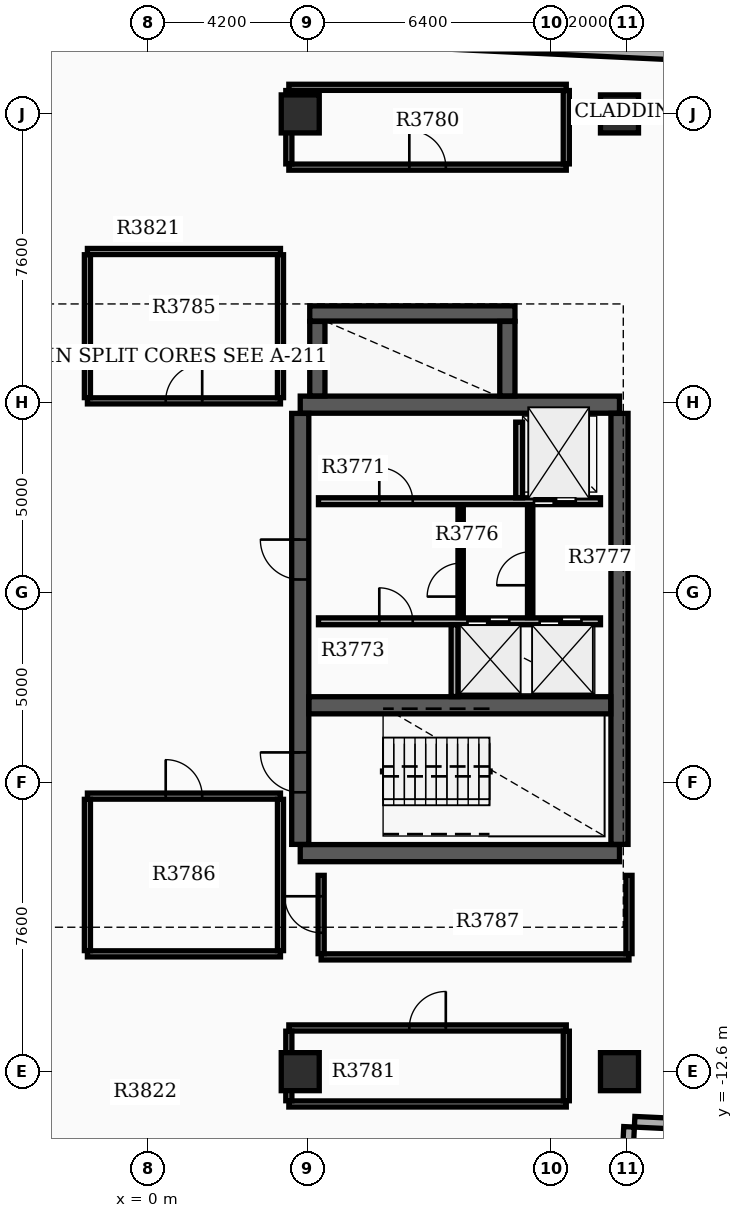
"""IFC4 building model, lengths in metres.
Left out: names, types, materials, properties, quantities, classifications, styles, units other than length and angle.
Written with IfcOpenShell. Run it as: python <this file> out.ifc"""

import sys

from ifc_helpers import new_model, si_unit, direction, frame, frame_2d, origin, origin_2d, place, context, subcontext, project, spatial, rectangle, extrude, element, fill, save


model = new_model("IFC4")
c1 = context("Model", 3, precision=1e-05, world=origin(), true_north=direction((0.0, 1.0)))
c2 = subcontext(c1, "Body", "Model", "MODEL_VIEW")
j1 = project(units=[si_unit("LENGTHUNIT", "METRE"), si_unit("PLANEANGLEUNIT", "RADIAN")], contexts=[c1])
p1 = place(None, origin())
s1 = spatial("IfcSite", under=j1, at=p1, CompositionType="ELEMENT")
p2 = place(p1, origin())
s2 = spatial("IfcBuilding", under=s1, at=p2, CompositionType="ELEMENT")
p3 = place(p2, frame((0.0, 0.0, 236.4)))
s3 = spatial("IfcBuildingStorey", under=s2, at=p3, CompositionType="ELEMENT", Elevation=236.4)
for number, where, z_axis, x_axis in (
    (1, (4.0, -6.85, 0.0), (0.0, 0.0, 1.0), (1.0, 0.0, 0.0)),
    (2, (4.0, 4.95, 0.0), (0.0, 0.0, 1.0), (1.0, 0.0, 0.0)),
):
    element("IfcWall", number, at=place(p3, frame(where, z_axis=z_axis, x_axis=x_axis)), inside=s3, PredefinedType="SHEAR", context=c2, shape_type="SweptSolid", body=[
        extrude(rectangle(XDim=8.4, YDim=0.45, at=frame_2d((4.2, 0.0))), origin(), (0.0, 0.0, 1.0), 3.65),
    ])
p4 = place(p3, frame((4.0, -6.62, 0.0), z_axis=(0.0, 0.0, 1.0), x_axis=(0.0, 1.0, 0.0)))
e3 = element("IfcWall", 3, at=p4, inside=s3, PredefinedType="SHEAR", context=c2, shape_type="SweptSolid", body=[
    extrude(rectangle(XDim=11.34, YDim=0.45, at=frame_2d((5.67, 0.0))), origin(), (0.0, 0.0, 1.0), 3.65),
])
p5 = place(p4, frame((1.37, 0.0, 0.0)))
e4 = element("IfcOpeningElement", 4, at=p5, cuts=e3, PredefinedType="OPENING", context=c2, shape_type="SweptSolid", body=[
    extrude(rectangle(XDim=1.05, YDim=2.15, at=frame_2d((0.525, 1.075))), frame((0.0, 0.235, 0.0), z_axis=(0.0, -1.0, 0.0), x_axis=(1.0, 0.0, 0.0)), (0.0, 0.0, 1.0), 0.47),
])
p6 = place(p4, frame((6.97, 0.0, 0.0)))
e5 = element("IfcOpeningElement", 5, at=p6, cuts=e3, PredefinedType="OPENING", context=c2, shape_type="SweptSolid", body=[
    extrude(rectangle(XDim=1.05, YDim=2.15, at=frame_2d((0.525, 1.075))), frame((0.0, 0.235, 0.0), z_axis=(0.0, -1.0, 0.0), x_axis=(1.0, 0.0, 0.0)), (0.0, 0.0, 1.0), 0.47),
])
p7 = place(p3, frame((12.4, -6.62, 0.0), z_axis=(0.0, 0.0, 1.0), x_axis=(0.0, 1.0, 0.0)))
e6 = element("IfcWall", 6, at=p7, inside=s3, PredefinedType="SHEAR", context=c2, shape_type="SweptSolid", body=[
    extrude(rectangle(XDim=11.34, YDim=0.45, at=frame_2d((5.67, 0.0))), origin(), (0.0, 0.0, 1.0), 3.65),
])
p8 = place(p3, frame((4.23, -2.96, 0.0), z_axis=(0.0, 0.0, 1.0), x_axis=(1.0, 0.0, 0.0)))
e7 = element("IfcWall", 7, at=p8, inside=s3, PredefinedType="SHEAR", context=c2, shape_type="SweptSolid", body=[
    extrude(rectangle(XDim=7.94, YDim=0.45, at=frame_2d((3.97, 0.0))), origin(), (0.0, 0.0, 1.0), 3.65),
])
p9 = place(p3, frame((4.45, 5.18, 0.0), z_axis=(0.0, 0.0, 1.0), x_axis=(0.0, 1.0, 0.0)))
e8 = element("IfcWall", 8, at=p9, inside=s3, PredefinedType="SHEAR", context=c2, shape_type="SweptSolid", body=[
    extrude(rectangle(XDim=1.96, YDim=0.4, at=frame_2d((0.98, 0.0))), origin(), (0.0, 0.0, 1.0), 3.65),
])
p10 = place(p3, frame((4.25, 7.35, 0.0), z_axis=(0.0, 0.0, 1.0), x_axis=(1.0, 0.0, 0.0)))
e9 = element("IfcWall", 9, at=p10, inside=s3, PredefinedType="SHEAR", context=c2, shape_type="SweptSolid", body=[
    extrude(rectangle(XDim=5.4, YDim=0.4, at=frame_2d((2.7, 0.0))), origin(), (0.0, 0.0, 1.0), 3.65),
])
p11 = place(p3, frame((9.45, 5.18, 0.0), z_axis=(0.0, 0.0, 1.0), x_axis=(0.0, 1.0, 0.0)))
e10 = element("IfcWall", 10, at=p11, inside=s3, PredefinedType="SHEAR", context=c2, shape_type="SweptSolid", body=[
    extrude(rectangle(XDim=1.96, YDim=0.4, at=frame_2d((0.98, 0.0))), origin(), (0.0, 0.0, 1.0), 3.65),
])
for number, where, z_axis, x_axis in (
    (11, (12.4, -12.6, 0.0), (0.0, 0.0, 1.0), (1.0, 0.0, 0.0)),
    (12, (12.4, 12.6, 0.0), (0.0, 0.0, 1.0), (1.0, 0.0, 0.0)),
    (13, (4.0, -12.6, 0.0), (0.0, 0.0, 1.0), (1.0, 0.0, 0.0)),
    (14, (4.0, 12.6, 0.0), (0.0, 0.0, 1.0), (1.0, 0.0, 0.0)),
):
    element("IfcColumn", number, at=place(p3, frame(where, z_axis=z_axis, x_axis=x_axis)), inside=s3, PredefinedType="COLUMN", context=c2, shape_type="SweptSolid", body=[
        extrude(rectangle(XDim=1.0, YDim=1.0, at=origin_2d()), origin(), (0.0, 0.0, 1.0), 3.9),
    ])
p12 = place(p3, frame((13.843, 14.164, 0.0), z_axis=(0.0, 0.0, 1.0), x_axis=(-0.998889082162, 0.047123258997, 0.0)))
e15 = element("IfcWall", 15, at=p12, inside=s3, PredefinedType="STANDARD", context=c2, shape_type="SweptSolid", body=[
    extrude(rectangle(XDim=6.3, YDim=0.28, at=frame_2d((3.15, 0.0))), origin(), (0.0, 0.0, 1.0), 3.13),
])
p13 = place(p3, frame((14.017, -13.976, 0.0), z_axis=(0.0, 0.0, 1.0), x_axis=(-0.998883930236, 0.047232339719, 0.0)))
e16 = element("IfcWall", 16, at=p13, inside=s3, PredefinedType="STANDARD", context=c2, shape_type="SweptSolid", body=[
    extrude(rectangle(XDim=1.22, YDim=0.28, at=frame_2d((0.61, 0.0))), origin(), (0.0, 0.0, 1.0), 3.13),
])
p14 = place(p3, frame((12.652, -14.052, 0.0), z_axis=(0.0, 0.0, 1.0), x_axis=(-0.047039284441, -0.99889304018, 0.0)))
e17 = element("IfcWall", 17, at=p14, inside=s3, PredefinedType="STANDARD", context=c2, shape_type="SweptSolid", body=[
    extrude(rectangle(XDim=1.5, YDim=0.28, at=frame_2d((0.75, 0.0))), origin(), (0.0, 0.0, 1.0), 3.13),
])
p15 = place(p3, frame((4.48, 2.41, 0.0), z_axis=(0.0, 0.0, 1.0), x_axis=(1.0, 0.0, 0.0)))
e18 = element("IfcWall", 18, at=p15, inside=s3, PredefinedType="SOLIDWALL", context=c2, shape_type="SweptSolid", body=[
    extrude(rectangle(XDim=7.42, YDim=0.18, at=frame_2d((3.71, 0.0))), origin(), (0.0, 0.0, 1.0), 3.12),
])
p16 = place(p15, frame((5.67, 0.0, 0.0)))
e19 = element("IfcOpeningElement", 19, at=p16, cuts=e18, PredefinedType="OPENING", context=c2, shape_type="SweptSolid", body=[
    extrude(rectangle(XDim=1.1, YDim=2.15, at=frame_2d((0.55, 1.075))), frame((0.0, 0.1, 0.0), z_axis=(0.0, -1.0, 0.0), x_axis=(1.0, 0.0, 0.0)), (0.0, 0.0, 1.0), 0.2),
])
p17 = place(p15, frame((1.6, 0.0, 0.0)))
e20 = element("IfcOpeningElement", 20, at=p17, cuts=e18, PredefinedType="OPENING", context=c2, shape_type="SweptSolid", body=[
    extrude(rectangle(XDim=0.88, YDim=2.1, at=frame_2d((0.44, 1.05))), frame((0.0, 0.1, 0.0), z_axis=(0.0, -1.0, 0.0), x_axis=(1.0, 0.0, 0.0)), (0.0, 0.0, 1.0), 0.2),
])
p18 = place(p3, frame((4.48, -0.75, 0.0), z_axis=(0.0, 0.0, 1.0), x_axis=(1.0, 0.0, 0.0)))
e21 = element("IfcWall", 21, at=p18, inside=s3, PredefinedType="SOLIDWALL", context=c2, shape_type="SweptSolid", body=[
    extrude(rectangle(XDim=7.42, YDim=0.18, at=frame_2d((3.71, 0.0))), origin(), (0.0, 0.0, 1.0), 3.12),
])
p19 = place(p18, frame((3.92, 0.0, 0.0)))
e22 = element("IfcOpeningElement", 22, at=p19, cuts=e21, PredefinedType="OPENING", context=c2, shape_type="SweptSolid", body=[
    extrude(rectangle(XDim=1.1, YDim=2.15, at=frame_2d((0.55, 1.075))), frame((0.0, 0.1, 0.0), z_axis=(0.0, -1.0, 0.0), x_axis=(1.0, 0.0, 0.0)), (0.0, 0.0, 1.0), 0.2),
])
p20 = place(p18, frame((5.82, 0.0, 0.0)))
e23 = element("IfcOpeningElement", 23, at=p20, cuts=e21, PredefinedType="OPENING", context=c2, shape_type="SweptSolid", body=[
    extrude(rectangle(XDim=1.1, YDim=2.15, at=frame_2d((0.55, 1.075))), frame((0.0, 0.1, 0.0), z_axis=(0.0, -1.0, 0.0), x_axis=(1.0, 0.0, 0.0)), (0.0, 0.0, 1.0), 0.2),
])
p21 = place(p18, frame((1.6, 0.0, 0.0)))
e24 = element("IfcOpeningElement", 24, at=p21, cuts=e21, PredefinedType="OPENING", context=c2, shape_type="SweptSolid", body=[
    extrude(rectangle(XDim=0.88, YDim=2.1, at=frame_2d((0.44, 1.05))), frame((0.0, 0.1, 0.0), z_axis=(0.0, -1.0, 0.0), x_axis=(1.0, 0.0, 0.0)), (0.0, 0.0, 1.0), 0.2),
])
p22 = place(p3, frame((9.76, 2.5, 0.0), z_axis=(0.0, 0.0, 1.0), x_axis=(0.0, 1.0, 0.0)))
e25 = element("IfcWall", 25, at=p22, inside=s3, PredefinedType="SOLIDWALL", context=c2, shape_type="SweptSolid", body=[
    extrude(rectangle(XDim=1.99, YDim=0.18, at=frame_2d((0.995, 0.0))), origin(), (0.0, 0.0, 1.0), 3.12),
])
p23 = place(p3, frame((8.06, -2.73, 0.0), z_axis=(0.0, 0.0, 1.0), x_axis=(0.0, 1.0, 0.0)))
e26 = element("IfcWall", 26, at=p23, inside=s3, PredefinedType="SOLIDWALL", context=c2, shape_type="SweptSolid", body=[
    extrude(rectangle(XDim=1.89, YDim=0.18, at=frame_2d((0.945, 0.0))), origin(), (0.0, 0.0, 1.0), 3.12),
])
p24 = place(p3, frame((8.22, -0.65, 0.0), z_axis=(0.0, 0.0, 1.0), x_axis=(0.0, 1.0, 0.0)))
e27 = element("IfcWall", 27, at=p24, inside=s3, PredefinedType="SOLIDWALL", context=c2, shape_type="SweptSolid", body=[
    extrude(rectangle(XDim=2.96, YDim=0.14, at=frame_2d((1.48, 0.0))), origin(), (0.0, 0.0, 1.0), 3.12),
])
p25 = place(p24, frame((0.55, 0.0, 0.0)))
e28 = element("IfcOpeningElement", 28, at=p25, cuts=e27, PredefinedType="OPENING", context=c2, shape_type="SweptSolid", body=[
    extrude(rectangle(XDim=0.88, YDim=2.1, at=frame_2d((0.44, 1.05))), frame((0.0, 0.08, 0.0), z_axis=(0.0, -1.0, 0.0), x_axis=(1.0, 0.0, 0.0)), (0.0, 0.0, 1.0), 0.16),
])
p26 = place(p3, frame((10.05, -0.652, 0.0), z_axis=(0.0, 0.0, 1.0), x_axis=(0.0, 1.0, 0.0)))
e29 = element("IfcWall", 29, at=p26, inside=s3, PredefinedType="PARTITIONING", context=c2, shape_type="SweptSolid", body=[
    extrude(rectangle(XDim=2.962, YDim=0.14, at=frame_2d((1.481, 0.0))), origin(), (0.0, 0.0, 1.0), 3.12),
])
p27 = place(p26, frame((0.85, 0.0, 0.0)))
e30 = element("IfcOpeningElement", 30, at=p27, cuts=e29, PredefinedType="OPENING", context=c2, shape_type="SweptSolid", body=[
    extrude(rectangle(XDim=0.88, YDim=2.1, at=frame_2d((0.44, 1.05))), frame((0.0, 0.08, 0.0), z_axis=(0.0, -1.0, 0.0), x_axis=(1.0, 0.0, 0.0)), (0.0, 0.0, 1.0), 0.16),
])
p28 = place(p3, frame((3.7, 11.2, 0.0), z_axis=(0.0, 0.0, 1.0), x_axis=(1.0, 0.0, 0.0)))
e31 = element("IfcWall", 31, at=p28, inside=s3, PredefinedType="PARTITIONING", context=c2, shape_type="SweptSolid", body=[
    extrude(rectangle(XDim=7.3, YDim=0.16, at=frame_2d((3.65, 0.0))), origin(), (0.0, 0.0, 1.0), 3.12),
])
p29 = place(p28, frame((3.17, 0.0, 0.0)))
e32 = element("IfcOpeningElement", 32, at=p29, cuts=e31, PredefinedType="OPENING", context=c2, shape_type="SweptSolid", body=[
    extrude(rectangle(XDim=0.96, YDim=2.15, at=frame_2d((0.48, 1.075))), frame((0.0, 0.09, 0.0), z_axis=(0.0, -1.0, 0.0), x_axis=(1.0, 0.0, 0.0)), (0.0, 0.0, 1.0), 0.18),
])
p30 = place(p3, frame((3.7, 13.3, 0.0), z_axis=(0.0, 0.0, 1.0), x_axis=(1.0, 0.0, 0.0)))
e33 = element("IfcWall", 33, at=p30, inside=s3, PredefinedType="PARTITIONING", context=c2, shape_type="SweptSolid", body=[
    extrude(rectangle(XDim=7.3, YDim=0.16, at=frame_2d((3.65, 0.0))), origin(), (0.0, 0.0, 1.0), 3.12),
])
for number, where, z_axis, x_axis in (
    (34, (3.7, 11.285, 0.0), (0.0, 0.0, 1.0), (0.0, 1.0, 0.0)),
    (35, (11.0, 11.285, 0.0), (0.0, 0.0, 1.0), (0.0, 1.0, 0.0)),
):
    element("IfcWall", number, at=place(p3, frame(where, z_axis=z_axis, x_axis=x_axis)), inside=s3, PredefinedType="PARTITIONING", context=c2, shape_type="SweptSolid", body=[
        extrude(rectangle(XDim=1.93, YDim=0.16, at=frame_2d((0.965, 0.0))), origin(), (0.0, 0.0, 1.0), 3.12),
    ])
p31 = place(p3, frame((3.7, -13.45, 0.0), z_axis=(0.0, 0.0, 1.0), x_axis=(1.0, 0.0, 0.0)))
e36 = element("IfcWall", 36, at=p31, inside=s3, PredefinedType="PARTITIONING", context=c2, shape_type="SweptSolid", body=[
    extrude(rectangle(XDim=7.3, YDim=0.16, at=frame_2d((3.65, 0.0))), origin(), (0.0, 0.0, 1.0), 3.12),
])
p32 = place(p3, frame((3.7, -11.45, 0.0), z_axis=(0.0, 0.0, 1.0), x_axis=(1.0, 0.0, 0.0)))
e37 = element("IfcWall", 37, at=p32, inside=s3, PredefinedType="PARTITIONING", context=c2, shape_type="SweptSolid", body=[
    extrude(rectangle(XDim=7.3, YDim=0.16, at=frame_2d((3.65, 0.0))), origin(), (0.0, 0.0, 1.0), 3.12),
])
p33 = place(p32, frame((3.17, 0.0, 0.0)))
e38 = element("IfcOpeningElement", 38, at=p33, cuts=e37, PredefinedType="OPENING", context=c2, shape_type="SweptSolid", body=[
    extrude(rectangle(XDim=0.96, YDim=2.15, at=frame_2d((0.48, 1.075))), frame((0.0, 0.09, 0.0), z_axis=(0.0, -1.0, 0.0), x_axis=(1.0, 0.0, 0.0)), (0.0, 0.0, 1.0), 0.18),
])
for number, where, z_axis, x_axis in (
    (39, (3.7, -13.365, 0.0), (0.0, 0.0, 1.0), (0.0, 1.0, 0.0)),
    (40, (11.0, -13.365, 0.0), (0.0, 0.0, 1.0), (0.0, 1.0, 0.0)),
):
    element("IfcWall", number, at=place(p3, frame(where, z_axis=z_axis, x_axis=x_axis)), inside=s3, PredefinedType="PARTITIONING", context=c2, shape_type="SweptSolid", body=[
        extrude(rectangle(XDim=1.83, YDim=0.16, at=frame_2d((0.915, 0.0))), origin(), (0.0, 0.0, 1.0), 3.12),
    ])
p34 = place(p3, frame((-1.6, 5.05, 0.0), z_axis=(0.0, 0.0, 1.0), x_axis=(1.0, 0.0, 0.0)))
e41 = element("IfcWall", 41, at=p34, inside=s3, PredefinedType="PARTITIONING", context=c2, shape_type="SweptSolid", body=[
    extrude(rectangle(XDim=5.08, YDim=0.16, at=frame_2d((2.54, 0.0))), origin(), (0.0, 0.0, 1.0), 3.12),
])
p35 = place(p34, frame((2.06, 0.0, 0.0)))
e42 = element("IfcOpeningElement", 42, at=p35, cuts=e41, PredefinedType="OPENING", context=c2, shape_type="SweptSolid", body=[
    extrude(rectangle(XDim=0.96, YDim=2.15, at=frame_2d((0.48, 1.075))), frame((0.0, 0.09, 0.0), z_axis=(0.0, -1.0, 0.0), x_axis=(1.0, 0.0, 0.0)), (0.0, 0.0, 1.0), 0.18),
])
p36 = place(p3, frame((-1.6, 8.98, 0.0), z_axis=(0.0, 0.0, 1.0), x_axis=(1.0, 0.0, 0.0)))
e43 = element("IfcWall", 43, at=p36, inside=s3, PredefinedType="PARTITIONING", context=c2, shape_type="SweptSolid", body=[
    extrude(rectangle(XDim=5.08, YDim=0.16, at=frame_2d((2.54, 0.0))), origin(), (0.0, 0.0, 1.0), 3.12),
])
for number, where, z_axis, x_axis in (
    (44, (-1.6, 5.135, 0.0), (0.0, 0.0, 1.0), (0.0, 1.0, 0.0)),
    (45, (3.48, 5.135, 0.0), (0.0, 0.0, 1.0), (0.0, 1.0, 0.0)),
):
    element("IfcWall", number, at=place(p3, frame(where, z_axis=z_axis, x_axis=x_axis)), inside=s3, PredefinedType="PARTITIONING", context=c2, shape_type="SweptSolid", body=[
        extrude(rectangle(XDim=3.76, YDim=0.16, at=frame_2d((1.88, 0.0))), origin(), (0.0, 0.0, 1.0), 3.12),
    ])
p37 = place(p3, frame((-1.6, -9.5, 0.0), z_axis=(0.0, 0.0, 1.0), x_axis=(1.0, 0.0, 0.0)))
e46 = element("IfcWall", 46, at=p37, inside=s3, PredefinedType="PARTITIONING", context=c2, shape_type="SweptSolid", body=[
    extrude(rectangle(XDim=5.08, YDim=0.16, at=frame_2d((2.54, 0.0))), origin(), (0.0, 0.0, 1.0), 3.12),
])
p38 = place(p3, frame((-1.6, -5.35, 0.0), z_axis=(0.0, 0.0, 1.0), x_axis=(1.0, 0.0, 0.0)))
e47 = element("IfcWall", 47, at=p38, inside=s3, PredefinedType="PARTITIONING", context=c2, shape_type="SweptSolid", body=[
    extrude(rectangle(XDim=5.08, YDim=0.16, at=frame_2d((2.54, 0.0))), origin(), (0.0, 0.0, 1.0), 3.12),
])
p39 = place(p38, frame((2.06, 0.0, 0.0)))
e48 = element("IfcOpeningElement", 48, at=p39, cuts=e47, PredefinedType="OPENING", context=c2, shape_type="SweptSolid", body=[
    extrude(rectangle(XDim=0.96, YDim=2.15, at=frame_2d((0.48, 1.075))), frame((0.0, 0.09, 0.0), z_axis=(0.0, -1.0, 0.0), x_axis=(1.0, 0.0, 0.0)), (0.0, 0.0, 1.0), 0.18),
])
for number, where, z_axis, x_axis in (
    (49, (-1.6, -9.415, 0.0), (0.0, 0.0, 1.0), (0.0, 1.0, 0.0)),
    (50, (3.48, -9.415, 0.0), (0.0, 0.0, 1.0), (0.0, 1.0, 0.0)),
):
    element("IfcWall", number, at=place(p3, frame(where, z_axis=z_axis, x_axis=x_axis)), inside=s3, PredefinedType="PARTITIONING", context=c2, shape_type="SweptSolid", body=[
        extrude(rectangle(XDim=3.98, YDim=0.16, at=frame_2d((1.99, 0.0))), origin(), (0.0, 0.0, 1.0), 3.12),
    ])
p40 = place(p3, frame((4.55, -9.58, 0.0), z_axis=(0.0, 0.0, 1.0), x_axis=(1.0, 0.0, 0.0)))
e51 = element("IfcWall", 51, at=p40, inside=s3, PredefinedType="PARTITIONING", context=c2, shape_type="SweptSolid", body=[
    extrude(rectangle(XDim=8.1, YDim=0.16, at=frame_2d((4.05, 0.0))), origin(), (0.0, 0.0, 1.0), 3.12),
])
p41 = place(p3, frame((4.55, -9.495, 0.0), z_axis=(0.0, 0.0, 1.0), x_axis=(0.0, 1.0, 0.0)))
e52 = element("IfcWall", 52, at=p41, inside=s3, PredefinedType="PARTITIONING", context=c2, shape_type="SweptSolid", body=[
    extrude(rectangle(XDim=2.06, YDim=0.16, at=frame_2d((1.03, 0.0))), origin(), (0.0, 0.0, 1.0), 3.12),
])
p42 = place(p41, frame((0.55, 0.0, 0.0)))
e53 = element("IfcOpeningElement", 53, at=p42, cuts=e52, PredefinedType="OPENING", context=c2, shape_type="SweptSolid", body=[
    extrude(rectangle(XDim=0.96, YDim=2.15, at=frame_2d((0.48, 1.075))), frame((0.0, 0.09, 0.0), z_axis=(0.0, -1.0, 0.0), x_axis=(1.0, 0.0, 0.0)), (0.0, 0.0, 1.0), 0.18),
])
p43 = place(p3, frame((12.65, -9.495, 0.0), z_axis=(0.0, 0.0, 1.0), x_axis=(0.0, 1.0, 0.0)))
e54 = element("IfcWall", 54, at=p43, inside=s3, PredefinedType="PARTITIONING", context=c2, shape_type="SweptSolid", body=[
    extrude(rectangle(XDim=2.06, YDim=0.16, at=frame_2d((1.03, 0.0))), origin(), (0.0, 0.0, 1.0), 3.12),
])
p44 = place(p5, origin())
e55 = element("IfcDoor", 55, at=p44, inside=s3, OperationType="SINGLE_SWING_RIGHT", PredefinedType="DOOR", context=c2, shape_type="SweptSolid", body=[
    extrude(rectangle(XDim=1.05, YDim=2.15, at=frame_2d((0.525, 1.075))), frame((0.0, 0.025, 0.0), z_axis=(0.0, -1.0, 0.0), x_axis=(1.0, 0.0, 0.0)), (0.0, 0.0, 1.0), 0.05),
])
fill(e4, e55)
p45 = place(p6, origin())
e56 = element("IfcDoor", 56, at=p45, inside=s3, OperationType="SINGLE_SWING_RIGHT", PredefinedType="DOOR", context=c2, shape_type="SweptSolid", body=[
    extrude(rectangle(XDim=1.05, YDim=2.15, at=frame_2d((0.525, 1.075))), frame((0.0, 0.025, 0.0), z_axis=(0.0, -1.0, 0.0), x_axis=(1.0, 0.0, 0.0)), (0.0, 0.0, 1.0), 0.05),
])
fill(e5, e56)
p46 = place(p16, origin())
e57 = element("IfcDoor", 57, at=p46, inside=s3, OperationType="DOUBLE_DOOR_SLIDING", PredefinedType="DOOR", context=c2, shape_type="SweptSolid", body=[
    extrude(rectangle(XDim=1.1, YDim=2.15, at=frame_2d((0.55, 1.075))), frame((0.0, 0.025, 0.0), z_axis=(0.0, -1.0, 0.0), x_axis=(1.0, 0.0, 0.0)), (0.0, 0.0, 1.0), 0.05),
])
fill(e19, e57)
p47 = place(p19, origin())
e58 = element("IfcDoor", 58, at=p47, inside=s3, OperationType="DOUBLE_DOOR_SLIDING", PredefinedType="DOOR", context=c2, shape_type="SweptSolid", body=[
    extrude(rectangle(XDim=1.1, YDim=2.15, at=frame_2d((0.55, 1.075))), frame((0.0, 0.025, 0.0), z_axis=(0.0, -1.0, 0.0), x_axis=(1.0, 0.0, 0.0)), (0.0, 0.0, 1.0), 0.05),
])
fill(e22, e58)
p48 = place(p20, origin())
e59 = element("IfcDoor", 59, at=p48, inside=s3, OperationType="DOUBLE_DOOR_SLIDING", PredefinedType="DOOR", context=c2, shape_type="SweptSolid", body=[
    extrude(rectangle(XDim=1.1, YDim=2.15, at=frame_2d((0.55, 1.075))), frame((0.0, 0.025, 0.0), z_axis=(0.0, -1.0, 0.0), x_axis=(1.0, 0.0, 0.0)), (0.0, 0.0, 1.0), 0.05),
])
fill(e23, e59)
p49 = place(p17, origin())
e60 = element("IfcDoor", 60, at=p49, inside=s3, OperationType="SINGLE_SWING_LEFT", PredefinedType="DOOR", context=c2, shape_type="SweptSolid", body=[
    extrude(rectangle(XDim=0.88, YDim=2.1, at=frame_2d((0.44, 1.05))), frame((0.0, 0.025, 0.0), z_axis=(0.0, -1.0, 0.0), x_axis=(1.0, 0.0, 0.0)), (0.0, 0.0, 1.0), 0.05),
])
fill(e20, e60)
p50 = place(p21, origin())
e61 = element("IfcDoor", 61, at=p50, inside=s3, OperationType="SINGLE_SWING_LEFT", PredefinedType="DOOR", context=c2, shape_type="SweptSolid", body=[
    extrude(rectangle(XDim=0.88, YDim=2.1, at=frame_2d((0.44, 1.05))), frame((0.0, 0.025, 0.0), z_axis=(0.0, -1.0, 0.0), x_axis=(1.0, 0.0, 0.0)), (0.0, 0.0, 1.0), 0.05),
])
fill(e24, e61)
p51 = place(p25, origin())
e62 = element("IfcDoor", 62, at=p51, inside=s3, OperationType="SINGLE_SWING_LEFT", PredefinedType="DOOR", context=c2, shape_type="SweptSolid", body=[
    extrude(rectangle(XDim=0.88, YDim=2.1, at=frame_2d((0.44, 1.05))), frame((0.0, 0.025, 0.0), z_axis=(0.0, -1.0, 0.0), x_axis=(1.0, 0.0, 0.0)), (0.0, 0.0, 1.0), 0.05),
])
fill(e28, e62)
p52 = place(p27, origin())
e63 = element("IfcDoor", 63, at=p52, inside=s3, OperationType="SINGLE_SWING_LEFT", PredefinedType="DOOR", context=c2, shape_type="SweptSolid", body=[
    extrude(rectangle(XDim=0.88, YDim=2.1, at=frame_2d((0.44, 1.05))), frame((0.0, 0.025, 0.0), z_axis=(0.0, -1.0, 0.0), x_axis=(1.0, 0.0, 0.0)), (0.0, 0.0, 1.0), 0.05),
])
fill(e30, e63)
p53 = place(p29, origin())
e64 = element("IfcDoor", 64, at=p53, inside=s3, OperationType="SINGLE_SWING_LEFT", PredefinedType="DOOR", context=c2, shape_type="SweptSolid", body=[
    extrude(rectangle(XDim=0.96, YDim=2.15, at=frame_2d((0.48, 1.075))), frame((0.0, 0.025, 0.0), z_axis=(0.0, -1.0, 0.0), x_axis=(1.0, 0.0, 0.0)), (0.0, 0.0, 1.0), 0.05),
])
fill(e32, e64)
p54 = place(p33, origin())
e65 = element("IfcDoor", 65, at=p54, inside=s3, OperationType="SINGLE_SWING_RIGHT", PredefinedType="DOOR", context=c2, shape_type="SweptSolid", body=[
    extrude(rectangle(XDim=0.96, YDim=2.15, at=frame_2d((0.48, 1.075))), frame((0.0, 0.025, 0.0), z_axis=(0.0, -1.0, 0.0), x_axis=(1.0, 0.0, 0.0)), (0.0, 0.0, 1.0), 0.05),
])
fill(e38, e65)
p55 = place(p35, origin())
e66 = element("IfcDoor", 66, at=p55, inside=s3, OperationType="SINGLE_SWING_RIGHT", PredefinedType="DOOR", context=c2, shape_type="SweptSolid", body=[
    extrude(rectangle(XDim=0.96, YDim=2.15, at=frame_2d((0.48, 1.075))), frame((0.0, 0.025, 0.0), z_axis=(0.0, -1.0, 0.0), x_axis=(1.0, 0.0, 0.0)), (0.0, 0.0, 1.0), 0.05),
])
fill(e42, e66)
p56 = place(p39, origin())
e67 = element("IfcDoor", 67, at=p56, inside=s3, OperationType="SINGLE_SWING_LEFT", PredefinedType="DOOR", context=c2, shape_type="SweptSolid", body=[
    extrude(rectangle(XDim=0.96, YDim=2.15, at=frame_2d((0.48, 1.075))), frame((0.0, 0.025, 0.0), z_axis=(0.0, -1.0, 0.0), x_axis=(1.0, 0.0, 0.0)), (0.0, 0.0, 1.0), 0.05),
])
fill(e48, e67)
p57 = place(p42, origin())
e68 = element("IfcDoor", 68, at=p57, inside=s3, OperationType="SINGLE_SWING_RIGHT", PredefinedType="DOOR", context=c2, shape_type="SweptSolid", body=[
    extrude(rectangle(XDim=0.96, YDim=2.15, at=frame_2d((0.48, 1.075))), frame((0.0, 0.025, 0.0), z_axis=(0.0, -1.0, 0.0), x_axis=(1.0, 0.0, 0.0)), (0.0, 0.0, 1.0), 0.05),
])
fill(e53, e68)
save(model, sys.argv[1])
